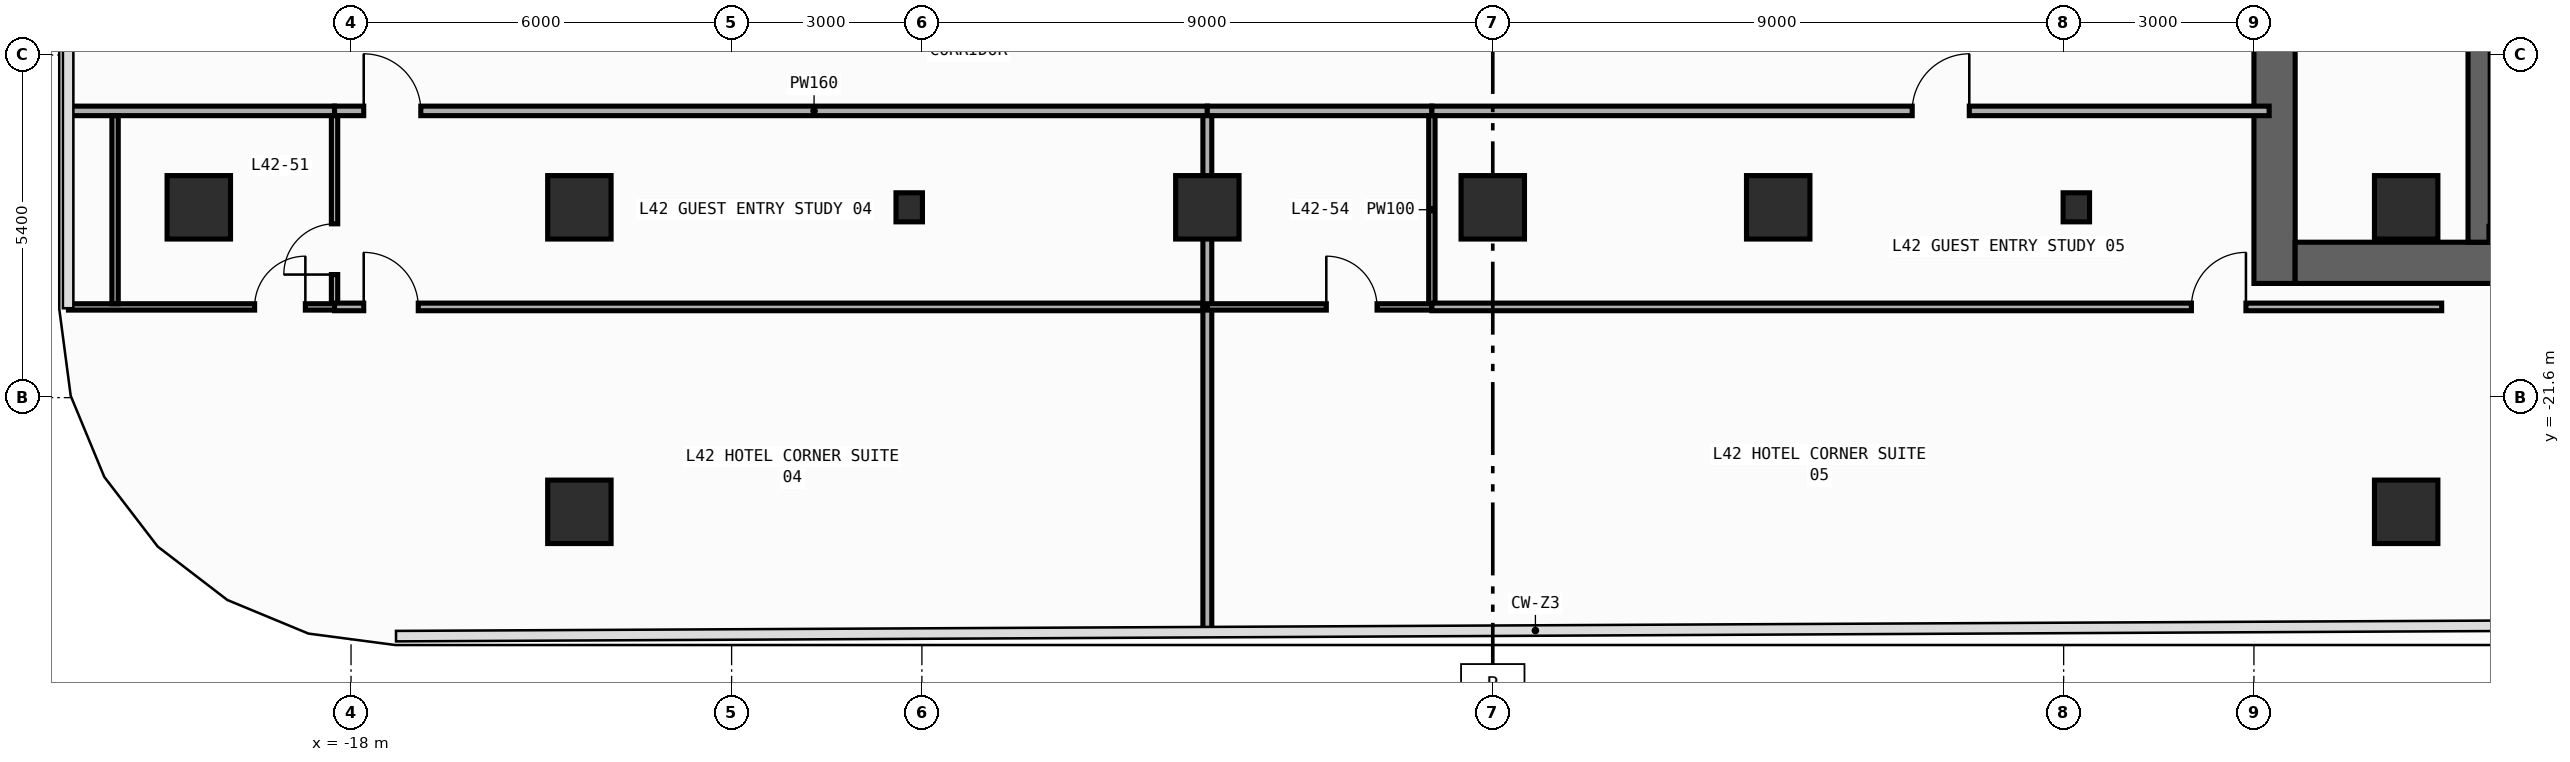
"""IFC4 building model, lengths in metres.
Left out: names, types, materials, properties, quantities, classifications, styles, units other than length and angle.
Written with IfcOpenShell. Run it as: python <this file> out.ifc"""

import sys

from ifc_helpers import new_model, si_unit, direction, frame, frame_2d, origin, origin_2d, place, context, subcontext, project, spatial, rectangle, i_section, extrude, element, fill, save


model = new_model("IFC4")
c1 = context("Model", 3, precision=1e-05, world=origin(), true_north=direction((0.0, 1.0)))
c2 = subcontext(c1, "Body", "Model", "MODEL_VIEW")
j1 = project(units=[si_unit("LENGTHUNIT", "METRE"), si_unit("PLANEANGLEUNIT", "RADIAN")], contexts=[c1])
p1 = place(None, origin())
s1 = spatial("IfcSite", under=j1, at=p1, CompositionType="ELEMENT")
p2 = place(p1, origin())
s2 = spatial("IfcBuilding", under=s1, at=p2, CompositionType="ELEMENT")
p3 = place(p2, frame((0.0, 0.0, 184.0)))
s3 = spatial("IfcBuildingStorey", under=s2, at=p3, CompositionType="ELEMENT", Elevation=184.0)
p4 = place(p3, frame((12.325, -19.8, 0.0), z_axis=(0.0, 0.0, 1.0), x_axis=(0.0, 1.0, 0.0)))
e1 = element("IfcWall", 1, at=p4, inside=s3, PredefinedType="SHEAR", context=c2, shape_type="SweptSolid", body=[
    extrude(rectangle(XDim=27.0, YDim=0.65, at=frame_2d((13.5, 0.0))), origin(), (0.0, 0.0, 1.0), 3.54),
])
p5 = place(p4, frame((23.05, 0.0, 0.0)))
e2 = element("IfcOpeningElement", 2, at=p5, cuts=e1, PredefinedType="OPENING", context=c2, shape_type="SweptSolid", body=[
    extrude(rectangle(XDim=1.1, YDim=2.2, at=frame_2d((0.55, 1.1))), frame((0.0, 0.335, 0.0), z_axis=(0.0, -1.0, 0.0), x_axis=(1.0, 0.0, 0.0)), (0.0, 0.0, 1.0), 0.67),
])
p6 = place(p4, frame((19.85, 0.0, 0.0)))
e3 = element("IfcOpeningElement", 3, at=p6, cuts=e1, PredefinedType="OPENING", context=c2, shape_type="SweptSolid", body=[
    extrude(rectangle(XDim=1.1, YDim=2.2, at=frame_2d((0.55, 1.1))), frame((0.0, 0.335, 0.0), z_axis=(0.0, -1.0, 0.0), x_axis=(1.0, 0.0, 0.0)), (0.0, 0.0, 1.0), 0.67),
])
p7 = place(p4, frame((16.65, 0.0, 0.0)))
e4 = element("IfcOpeningElement", 4, at=p7, cuts=e1, PredefinedType="OPENING", context=c2, shape_type="SweptSolid", body=[
    extrude(rectangle(XDim=1.1, YDim=2.2, at=frame_2d((0.55, 1.1))), frame((0.0, 0.335, 0.0), z_axis=(0.0, -1.0, 0.0), x_axis=(1.0, 0.0, 0.0)), (0.0, 0.0, 1.0), 0.67),
])
p8 = place(p4, frame((6.275, 0.0, 0.0)))
e5 = element("IfcOpeningElement", 5, at=p8, cuts=e1, PredefinedType="OPENING", context=c2, shape_type="SweptSolid", body=[
    extrude(rectangle(XDim=0.85, YDim=2.1, at=frame_2d((0.425, 1.05))), frame((0.0, 0.335, 0.0), z_axis=(0.0, -1.0, 0.0), x_axis=(1.0, 0.0, 0.0)), (0.0, 0.0, 1.0), 0.67),
])
p9 = place(p4, frame((8.575, 0.0, 0.0)))
e6 = element("IfcOpeningElement", 6, at=p9, cuts=e1, PredefinedType="OPENING", context=c2, shape_type="SweptSolid", body=[
    extrude(rectangle(XDim=0.85, YDim=2.1, at=frame_2d((0.425, 1.05))), frame((0.0, 0.335, 0.0), z_axis=(0.0, -1.0, 0.0), x_axis=(1.0, 0.0, 0.0)), (0.0, 0.0, 1.0), 0.67),
])
p10 = place(p4, frame((10.675, 0.0, 0.0)))
e7 = element("IfcOpeningElement", 7, at=p10, cuts=e1, PredefinedType="OPENING", context=c2, shape_type="SweptSolid", body=[
    extrude(rectangle(XDim=0.85, YDim=2.1, at=frame_2d((0.425, 1.05))), frame((0.0, 0.335, 0.0), z_axis=(0.0, -1.0, 0.0), x_axis=(1.0, 0.0, 0.0)), (0.0, 0.0, 1.0), 0.67),
])
p11 = place(p4, frame((12.725, 0.0, 0.0)))
e8 = element("IfcOpeningElement", 8, at=p11, cuts=e1, PredefinedType="OPENING", context=c2, shape_type="SweptSolid", body=[
    extrude(rectangle(XDim=1.15, YDim=2.2, at=frame_2d((0.575, 1.1))), frame((0.0, 0.335, 0.0), z_axis=(0.0, -1.0, 0.0), x_axis=(1.0, 0.0, 0.0)), (0.0, 0.0, 1.0), 0.67),
])
p12 = place(p4, frame((25.125, 0.0, 0.0)))
e9 = element("IfcOpeningElement", 9, at=p12, cuts=e1, PredefinedType="OPENING", context=c2, shape_type="SweptSolid", body=[
    extrude(rectangle(XDim=0.85, YDim=2.1, at=frame_2d((0.425, 1.05))), frame((0.0, 0.335, 0.0), z_axis=(0.0, -1.0, 0.0), x_axis=(1.0, 0.0, 0.0)), (0.0, 0.0, 1.0), 0.67),
])
p13 = place(p3, frame((12.65, -19.475, 0.0), z_axis=(0.0, 0.0, 1.0), x_axis=(1.0, 0.0, 0.0)))
e10 = element("IfcWall", 10, at=p13, inside=s3, PredefinedType="SHEAR", context=c2, shape_type="SweptSolid", body=[
    extrude(rectangle(XDim=7.1, YDim=0.65, at=frame_2d((3.55, 0.0))), origin(), (0.0, 0.0, 1.0), 3.54),
])
p14 = place(p3, frame((15.55, -19.15, 0.0), z_axis=(0.0, 0.0, 1.0), x_axis=(0.0, 1.0, 0.0)))
e11 = element("IfcWall", 11, at=p14, inside=s3, PredefinedType="SHEAR", context=c2, shape_type="SweptSolid", body=[
    extrude(rectangle(XDim=25.7, YDim=0.35, at=frame_2d((12.85, 0.0))), origin(), (0.0, 0.0, 1.0), 3.54),
])
p15 = place(p14, frame((12.075, 0.0, 0.0)))
e12 = element("IfcOpeningElement", 12, at=p15, cuts=e11, PredefinedType="OPENING", context=c2, shape_type="SweptSolid", body=[
    extrude(rectangle(XDim=1.15, YDim=2.2, at=frame_2d((0.575, 1.1))), frame((0.0, 0.185, 0.0), z_axis=(0.0, -1.0, 0.0), x_axis=(1.0, 0.0, 0.0)), (0.0, 0.0, 1.0), 0.37),
])
p16 = place(p14, frame((24.475, 0.0, 0.0)))
e13 = element("IfcOpeningElement", 13, at=p16, cuts=e11, PredefinedType="OPENING", context=c2, shape_type="SweptSolid", body=[
    extrude(rectangle(XDim=0.85, YDim=2.1, at=frame_2d((0.425, 1.05))), frame((0.0, 0.185, 0.0), z_axis=(0.0, -1.0, 0.0), x_axis=(1.0, 0.0, 0.0)), (0.0, 0.0, 1.0), 0.37),
])
p17 = place(p3, frame((15.705, -19.01, 0.0), z_axis=(0.0, 0.0, 1.0), x_axis=(1.0, 0.0, 0.0)))
e14 = element("IfcWall", 14, at=p17, inside=s3, PredefinedType="SHEAR", context=c2, shape_type="SweptSolid", body=[
    extrude(rectangle(XDim=4.065, YDim=0.22, at=frame_2d((2.032, 0.0))), origin(), (0.0, 0.0, 1.0), 3.54),
])
for number, where, z_axis, x_axis in (
    (15, (-9.2, -18.6, 0.0), (0.0, 0.0, 1.0), (1.0, 0.0, 0.0)),
    (16, (9.2, -18.6, 0.0), (0.0, 0.0, 1.0), (1.0, 0.0, 0.0)),
):
    element("IfcColumn", number, at=place(p3, frame(where, z_axis=z_axis, x_axis=x_axis)), inside=s3, PredefinedType="COLUMN", context=c2, shape_type="SweptSolid", body=[
        extrude(i_section(OverallWidth=0.417, OverallDepth=0.458, WebThickness=0.03, FlangeThickness=0.05, FilletRadius=0.022, at=origin_2d()), origin(), (0.0, 0.0, 1.0), 3.8),
    ])
for number, where, z_axis, x_axis in (
    (17, (-20.4, -18.6, 0.0), (0.0, 0.0, 1.0), (1.0, 0.0, 0.0)),
    (18, (-14.4, -18.6, 0.0), (0.0, 0.0, 1.0), (1.0, 0.0, 0.0)),
    (19, (14.4, -18.6, 0.0), (0.0, 0.0, 1.0), (1.0, 0.0, 0.0)),
    (20, (-4.5, -18.6, 0.0), (0.0, 0.0, 1.0), (1.0, 0.0, 0.0)),
    (21, (0.0, -18.6, 0.0), (0.0, 0.0, 1.0), (1.0, 0.0, 0.0)),
    (22, (4.5, -18.6, 0.0), (0.0, 0.0, 1.0), (1.0, 0.0, 0.0)),
    (23, (-14.4, -23.4, 0.0), (0.0, 0.0, 1.0), (1.0, 0.0, 0.0)),
    (24, (14.4, -23.4, 0.0), (0.0, 0.0, 1.0), (1.0, 0.0, 0.0)),
):
    element("IfcColumn", number, at=place(p3, frame(where, z_axis=z_axis, x_axis=x_axis)), inside=s3, PredefinedType="COLUMN", context=c2, shape_type="SweptSolid", body=[
        extrude(rectangle(XDim=1.0, YDim=1.0, at=origin_2d()), origin(), (0.0, 0.0, 1.0), 3.8),
    ])
p18 = place(p3, frame((-22.455, -17.08, 0.0), z_axis=(0.0, 0.0, 1.0), x_axis=(1.0, 0.0, 0.0)))
e25 = element("IfcWall", 25, at=p18, inside=s3, PredefinedType="PARTITIONING", context=c2, shape_type="SweptSolid", body=[
    extrude(rectangle(XDim=4.195, YDim=0.15, at=frame_2d((2.098, 0.0))), origin(), (0.0, 0.0, 1.0), 3.54),
])
p19 = place(p3, frame((-18.26, -17.08, 0.0), z_axis=(0.0, 0.0, 1.0), x_axis=(1.0, 0.0, 0.0)))
e26 = element("IfcWall", 26, at=p19, inside=s3, PredefinedType="PARTITIONING", context=c2, shape_type="SweptSolid", body=[
    extrude(rectangle(XDim=13.76, YDim=0.15, at=frame_2d((6.88, 0.0))), origin(), (0.0, 0.0, 1.0), 3.54),
])
p20 = place(p19, frame((0.46, 0.0, 0.0)))
e27 = element("IfcOpeningElement", 27, at=p20, cuts=e26, PredefinedType="OPENING", context=c2, shape_type="SweptSolid", body=[
    extrude(rectangle(XDim=0.9, YDim=2.15, at=frame_2d((0.45, 1.075))), frame((0.0, 0.085, 0.0), z_axis=(0.0, -1.0, 0.0), x_axis=(1.0, 0.0, 0.0)), (0.0, 0.0, 1.0), 0.17),
])
p21 = place(p3, frame((-4.5, -17.08, 0.0), z_axis=(0.0, 0.0, 1.0), x_axis=(1.0, 0.0, 0.0)))
e28 = element("IfcWall", 28, at=p21, inside=s3, PredefinedType="PARTITIONING", context=c2, shape_type="SweptSolid", body=[
    extrude(rectangle(XDim=3.54, YDim=0.15, at=frame_2d((1.77, 0.0))), origin(), (0.0, 0.0, 1.0), 3.54),
])
p22 = place(p3, frame((-0.96, -17.08, 0.0), z_axis=(0.0, 0.0, 1.0), x_axis=(1.0, 0.0, 0.0)))
e29 = element("IfcWall", 29, at=p22, inside=s3, PredefinedType="PARTITIONING", context=c2, shape_type="SweptSolid", body=[
    extrude(rectangle(XDim=13.2, YDim=0.15, at=frame_2d((6.6, 0.0))), origin(), (0.0, 0.0, 1.0), 3.54),
])
p23 = place(p22, frame((7.573, 0.0, 0.0)))
e30 = element("IfcOpeningElement", 30, at=p23, cuts=e29, PredefinedType="OPENING", context=c2, shape_type="SweptSolid", body=[
    extrude(rectangle(XDim=0.9, YDim=2.15, at=frame_2d((0.45, 1.075))), frame((0.0, 0.085, 0.0), z_axis=(0.0, -1.0, 0.0), x_axis=(1.0, 0.0, 0.0)), (0.0, 0.0, 1.0), 0.17),
])
p24 = place(p3, frame((-18.26, -20.12, 0.0), z_axis=(0.0, 0.0, 1.0), x_axis=(0.0, 1.0, 0.0)))
e31 = element("IfcWall", 31, at=p24, inside=s3, PredefinedType="PARTITIONING", context=c2, shape_type="SweptSolid", body=[
    extrude(rectangle(XDim=2.965, YDim=0.1, at=frame_2d((1.482, 0.0))), origin(), (0.0, 0.0, 1.0), 3.54),
])
p25 = place(p24, frame((0.46, 0.0, 0.0)))
e32 = element("IfcOpeningElement", 32, at=p25, cuts=e31, PredefinedType="OPENING", context=c2, shape_type="SweptSolid", body=[
    extrude(rectangle(XDim=0.8, YDim=2.1, at=frame_2d((0.4, 1.05))), frame((0.0, 0.06, 0.0), z_axis=(0.0, -1.0, 0.0), x_axis=(1.0, 0.0, 0.0)), (0.0, 0.0, 1.0), 0.12),
])
p26 = place(p3, frame((-22.455, -20.17, 0.0), z_axis=(0.0, 0.0, 1.0), x_axis=(1.0, 0.0, 0.0)))
e33 = element("IfcWall", 33, at=p26, inside=s3, PredefinedType="PARTITIONING", context=c2, shape_type="SweptSolid", body=[
    extrude(rectangle(XDim=4.195, YDim=0.1, at=frame_2d((2.098, 0.0))), origin(), (0.0, 0.0, 1.0), 3.54),
])
p27 = place(p26, frame((2.935, 0.0, 0.0)))
e34 = element("IfcOpeningElement", 34, at=p27, cuts=e33, PredefinedType="OPENING", context=c2, shape_type="SweptSolid", body=[
    extrude(rectangle(XDim=0.8, YDim=2.1, at=frame_2d((0.4, 1.05))), frame((0.0, 0.06, 0.0), z_axis=(0.0, -1.0, 0.0), x_axis=(1.0, 0.0, 0.0)), (0.0, 0.0, 1.0), 0.12),
])
p28 = place(p3, frame((-18.26, -20.17, 0.0), z_axis=(0.0, 0.0, 1.0), x_axis=(1.0, 0.0, 0.0)))
e35 = element("IfcWall", 35, at=p28, inside=s3, PredefinedType="PARTITIONING", context=c2, shape_type="SweptSolid", body=[
    extrude(rectangle(XDim=13.76, YDim=0.12, at=frame_2d((6.88, 0.0))), origin(), (0.0, 0.0, 1.0), 3.54),
])
p29 = place(p28, frame((0.46, 0.0, 0.0)))
e36 = element("IfcOpeningElement", 36, at=p29, cuts=e35, PredefinedType="OPENING", context=c2, shape_type="SweptSolid", body=[
    extrude(rectangle(XDim=0.86, YDim=2.15, at=frame_2d((0.43, 1.075))), frame((0.0, 0.07, 0.0), z_axis=(0.0, -1.0, 0.0), x_axis=(1.0, 0.0, 0.0)), (0.0, 0.0, 1.0), 0.14),
])
p30 = place(p3, frame((-4.5, -20.17, 0.0), z_axis=(0.0, 0.0, 1.0), x_axis=(0.0, 1.0, 0.0)))
e37 = element("IfcWall", 37, at=p30, inside=s3, PredefinedType="PARTITIONING", context=c2, shape_type="SweptSolid", body=[
    extrude(rectangle(XDim=3.015, YDim=0.14, at=frame_2d((1.507, 0.0))), origin(), (0.0, 0.0, 1.0), 3.54),
])
p31 = place(p3, frame((-4.5, -25.292, 0.0), z_axis=(0.0, 0.0, 1.0), x_axis=(0.0, 1.0, 0.0)))
e38 = element("IfcWall", 38, at=p31, inside=s3, PredefinedType="PARTITIONING", context=c2, shape_type="SweptSolid", body=[
    extrude(rectangle(XDim=5.122, YDim=0.14, at=frame_2d((2.561, 0.0))), origin(), (0.0, 0.0, 1.0), 3.54),
])
p32 = place(p3, frame((-0.96, -20.12, 0.0), z_axis=(0.0, 0.0, 1.0), x_axis=(0.0, 1.0, 0.0)))
e39 = element("IfcWall", 39, at=p32, inside=s3, PredefinedType="PARTITIONING", context=c2, shape_type="SweptSolid", body=[
    extrude(rectangle(XDim=2.965, YDim=0.1, at=frame_2d((1.482, 0.0))), origin(), (0.0, 0.0, 1.0), 3.54),
])
p33 = place(p3, frame((-4.5, -20.17, 0.0), z_axis=(0.0, 0.0, 1.0), x_axis=(1.0, 0.0, 0.0)))
e40 = element("IfcWall", 40, at=p33, inside=s3, PredefinedType="PARTITIONING", context=c2, shape_type="SweptSolid", body=[
    extrude(rectangle(XDim=3.54, YDim=0.1, at=frame_2d((1.77, 0.0))), origin(), (0.0, 0.0, 1.0), 3.54),
])
p34 = place(p33, frame((1.875, 0.0, 0.0)))
e41 = element("IfcOpeningElement", 41, at=p34, cuts=e40, PredefinedType="OPENING", context=c2, shape_type="SweptSolid", body=[
    extrude(rectangle(XDim=0.8, YDim=2.1, at=frame_2d((0.4, 1.05))), frame((0.0, 0.06, 0.0), z_axis=(0.0, -1.0, 0.0), x_axis=(1.0, 0.0, 0.0)), (0.0, 0.0, 1.0), 0.12),
])
p35 = place(p3, frame((-0.96, -20.17, 0.0), z_axis=(0.0, 0.0, 1.0), x_axis=(1.0, 0.0, 0.0)))
e42 = element("IfcWall", 42, at=p35, inside=s3, PredefinedType="PARTITIONING", context=c2, shape_type="SweptSolid", body=[
    extrude(rectangle(XDim=15.92, YDim=0.12, at=frame_2d((7.96, 0.0))), origin(), (0.0, 0.0, 1.0), 3.54),
])
p36 = place(p35, frame((11.974, 0.0, 0.0)))
e43 = element("IfcOpeningElement", 43, at=p36, cuts=e42, PredefinedType="OPENING", context=c2, shape_type="SweptSolid", body=[
    extrude(rectangle(XDim=0.86, YDim=2.15, at=frame_2d((0.43, 1.075))), frame((0.0, 0.07, 0.0), z_axis=(0.0, -1.0, 0.0), x_axis=(1.0, 0.0, 0.0)), (0.0, 0.0, 1.0), 0.14),
])
p37 = place(p3, frame((-21.72, -20.12, 0.0), z_axis=(0.0, 0.0, 1.0), x_axis=(0.0, 1.0, 0.0)))
e44 = element("IfcWall", 44, at=p37, inside=s3, PredefinedType="PARTITIONING", context=c2, shape_type="SweptSolid", body=[
    extrude(rectangle(XDim=2.965, YDim=0.1, at=frame_2d((1.482, 0.0))), origin(), (0.0, 0.0, 1.0), 3.54),
])
p38 = place(p20, origin())
e45 = element("IfcDoor", 45, at=p38, inside=s3, OperationType="SINGLE_SWING_LEFT", PredefinedType="DOOR", context=c2, shape_type="SweptSolid", body=[
    extrude(rectangle(XDim=0.9, YDim=2.15, at=frame_2d((0.45, 1.075))), frame((0.0, 0.025, 0.0), z_axis=(0.0, -1.0, 0.0), x_axis=(1.0, 0.0, 0.0)), (0.0, 0.0, 1.0), 0.05),
])
fill(e27, e45)
p39 = place(p23, origin())
e46 = element("IfcDoor", 46, at=p39, inside=s3, OperationType="SINGLE_SWING_RIGHT", PredefinedType="DOOR", context=c2, shape_type="SweptSolid", body=[
    extrude(rectangle(XDim=0.9, YDim=2.15, at=frame_2d((0.45, 1.075))), frame((0.0, 0.025, 0.0), z_axis=(0.0, -1.0, 0.0), x_axis=(1.0, 0.0, 0.0)), (0.0, 0.0, 1.0), 0.05),
])
fill(e30, e46)
p40 = place(p25, origin())
e47 = element("IfcDoor", 47, at=p40, inside=s3, OperationType="SINGLE_SWING_LEFT", PredefinedType="DOOR", context=c2, shape_type="SweptSolid", body=[
    extrude(rectangle(XDim=0.8, YDim=2.1, at=frame_2d((0.4, 1.05))), frame((0.0, 0.025, 0.0), z_axis=(0.0, -1.0, 0.0), x_axis=(1.0, 0.0, 0.0)), (0.0, 0.0, 1.0), 0.05),
])
fill(e32, e47)
p41 = place(p27, origin())
e48 = element("IfcDoor", 48, at=p41, inside=s3, OperationType="SINGLE_SWING_RIGHT", PredefinedType="DOOR", context=c2, shape_type="SweptSolid", body=[
    extrude(rectangle(XDim=0.8, YDim=2.1, at=frame_2d((0.4, 1.05))), frame((0.0, 0.025, 0.0), z_axis=(0.0, -1.0, 0.0), x_axis=(1.0, 0.0, 0.0)), (0.0, 0.0, 1.0), 0.05),
])
fill(e34, e48)
p42 = place(p29, origin())
e49 = element("IfcDoor", 49, at=p42, inside=s3, OperationType="SINGLE_SWING_LEFT", PredefinedType="DOOR", context=c2, shape_type="SweptSolid", body=[
    extrude(rectangle(XDim=0.86, YDim=2.15, at=frame_2d((0.43, 1.075))), frame((0.0, 0.025, 0.0), z_axis=(0.0, -1.0, 0.0), x_axis=(1.0, 0.0, 0.0)), (0.0, 0.0, 1.0), 0.05),
])
fill(e36, e49)
p43 = place(p34, origin())
e50 = element("IfcDoor", 50, at=p43, inside=s3, OperationType="SINGLE_SWING_LEFT", PredefinedType="DOOR", context=c2, shape_type="SweptSolid", body=[
    extrude(rectangle(XDim=0.8, YDim=2.1, at=frame_2d((0.4, 1.05))), frame((0.0, 0.025, 0.0), z_axis=(0.0, -1.0, 0.0), x_axis=(1.0, 0.0, 0.0)), (0.0, 0.0, 1.0), 0.05),
])
fill(e41, e50)
p44 = place(p36, origin())
e51 = element("IfcDoor", 51, at=p44, inside=s3, OperationType="SINGLE_SWING_RIGHT", PredefinedType="DOOR", context=c2, shape_type="SweptSolid", body=[
    extrude(rectangle(XDim=0.86, YDim=2.15, at=frame_2d((0.43, 1.075))), frame((0.0, 0.025, 0.0), z_axis=(0.0, -1.0, 0.0), x_axis=(1.0, 0.0, 0.0)), (0.0, 0.0, 1.0), 0.05),
])
fill(e43, e51)
save(model, sys.argv[1])
